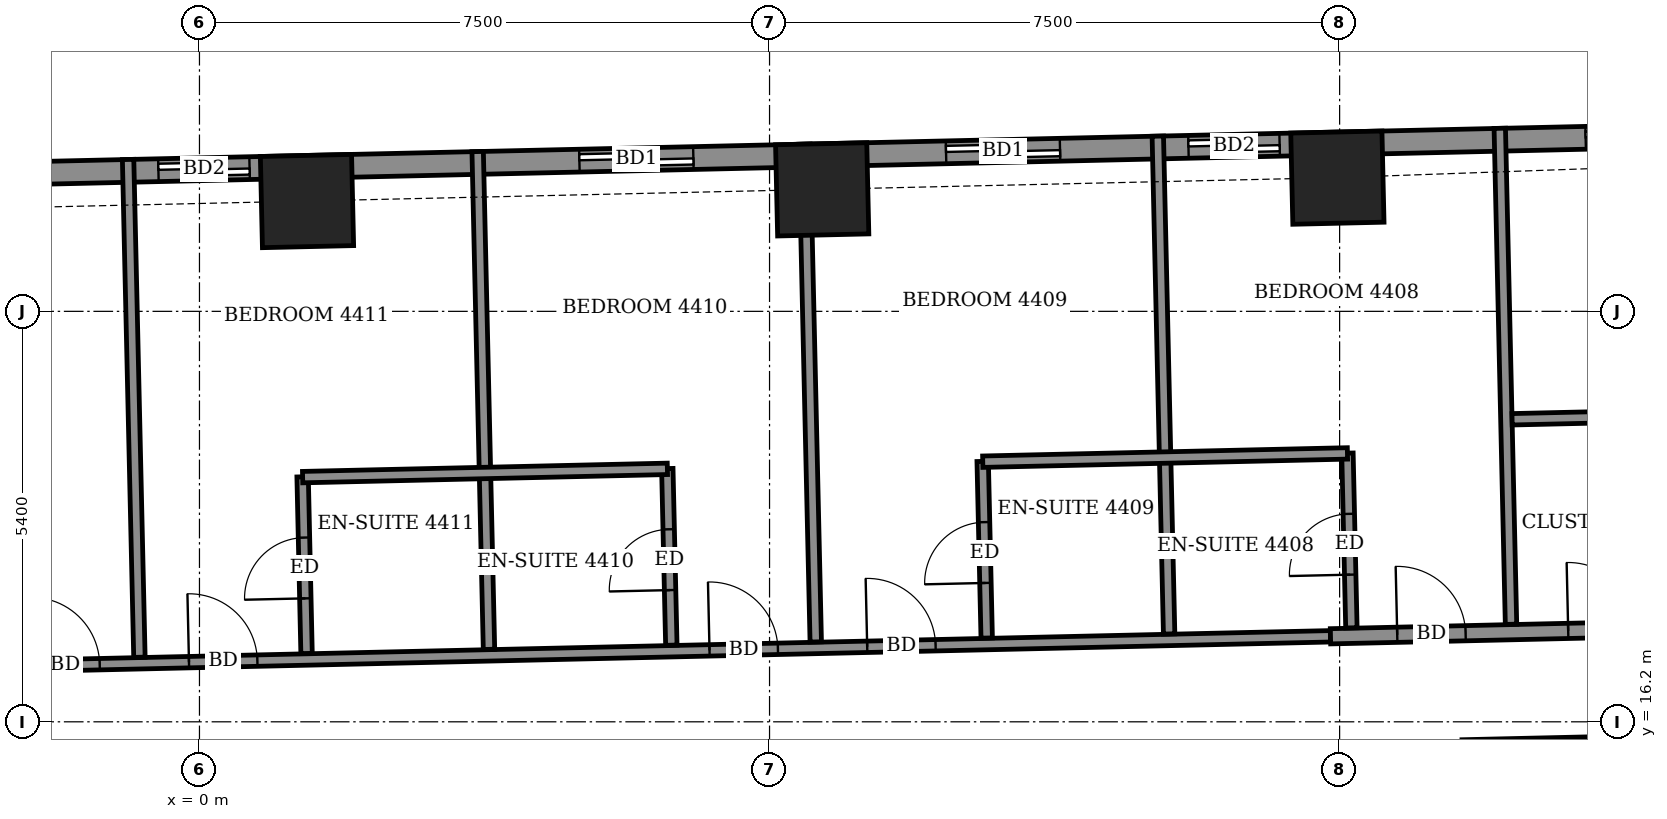
"""IFC4 building model, lengths in metres.
Left out: names, types, materials, properties, quantities, classifications, styles, units other than length and angle.
Written with IfcOpenShell. Run it as: python <this file> out.ifc"""

import sys

from ifc_helpers import new_model, si_unit, direction, frame, frame_2d, origin, origin_2d, place, context, subcontext, project, spatial, rectangle, extrude, element, fill, save


model = new_model("IFC4")
c1 = context("Model", 3, precision=1e-05, world=origin(), true_north=direction((0.0, 1.0)))
c2 = subcontext(c1, "Body", "Model", "MODEL_VIEW")
j1 = project(units=[si_unit("LENGTHUNIT", "METRE"), si_unit("PLANEANGLEUNIT", "RADIAN")], contexts=[c1])
p1 = place(None, origin())
s1 = spatial("IfcSite", under=j1, at=p1, CompositionType="ELEMENT")
p2 = place(p1, origin())
s2 = spatial("IfcBuilding", under=s1, at=p2, CompositionType="ELEMENT")
p3 = place(p2, frame((0.0, 0.0, 175.3)))
s3 = spatial("IfcBuildingStorey", under=s2, at=p3, CompositionType="ELEMENT", Elevation=175.3)
for number, where, z_axis, x_axis in (
    (1, (14.971, 23.359, -0.55), (0.0, 0.0, 1.0), (-1.0, -0.023, 0.0)),
    (2, (8.193, 23.205, -0.55), (0.0, 0.0, 1.0), (-1.0, -0.023, 0.0)),
    (3, (1.415, 23.051, -0.55), (0.0, 0.0, 1.0), (-1.0, -0.023, 0.0)),
):
    element("IfcColumn", number, at=place(p3, frame(where, z_axis=z_axis, x_axis=x_axis)), inside=s3, PredefinedType="COLUMN", context=c2, shape_type="SweptSolid", body=[
        extrude(rectangle(XDim=1.2, YDim=1.2, at=origin_2d()), origin(), (0.0, 0.0, 1.0), 3.6),
    ])
p4 = place(p3, frame((21.589, 23.959, 0.0), z_axis=(0.0, 0.0, 1.0), x_axis=(-0.999742671382, -0.022684598702, 0.0)))
e4 = element("IfcWall", 4, at=p4, inside=s3, PredefinedType="SOLIDWALL", context=c2, shape_type="SweptSolid", body=[
    extrude(rectangle(XDim=40.381, YDim=0.3, at=frame_2d((20.19, 0.0))), origin(), (0.0, 0.0, 1.0), 3.05),
])
p5 = place(p4, frame((1.853, 0.0, 0.0)))
e5 = element("IfcOpeningElement", 5, at=p5, cuts=e4, PredefinedType="OPENING", context=c2, shape_type="SweptSolid", body=[
    extrude(rectangle(XDim=1.5, YDim=2.4, at=frame_2d((0.75, 1.2))), frame((0.0, 0.16, 0.0), z_axis=(0.0, -1.0, 0.0), x_axis=(1.0, 0.0, 0.0)), (0.0, 0.0, 1.0), 0.32),
])
p6 = place(p4, frame((7.38, 0.0, 0.0)))
e6 = element("IfcOpeningElement", 6, at=p6, cuts=e4, PredefinedType="OPENING", context=c2, shape_type="SweptSolid", body=[
    extrude(rectangle(XDim=1.2, YDim=2.4, at=frame_2d((0.6, 1.2))), frame((0.0, 0.16, 0.0), z_axis=(0.0, -1.0, 0.0), x_axis=(1.0, 0.0, 0.0)), (0.0, 0.0, 1.0), 0.32),
])
p7 = place(p4, frame((10.27, 0.0, 0.0)))
e7 = element("IfcOpeningElement", 7, at=p7, cuts=e4, PredefinedType="OPENING", context=c2, shape_type="SweptSolid", body=[
    extrude(rectangle(XDim=1.5, YDim=2.4, at=frame_2d((0.75, 1.2))), frame((0.0, 0.16, 0.0), z_axis=(0.0, -1.0, 0.0), x_axis=(1.0, 0.0, 0.0)), (0.0, 0.0, 1.0), 0.32),
])
p8 = place(p4, frame((15.095, 0.0, 0.0)))
e8 = element("IfcOpeningElement", 8, at=p8, cuts=e4, PredefinedType="OPENING", context=c2, shape_type="SweptSolid", body=[
    extrude(rectangle(XDim=1.5, YDim=2.4, at=frame_2d((0.75, 1.2))), frame((0.0, 0.16, 0.0), z_axis=(0.0, -1.0, 0.0), x_axis=(1.0, 0.0, 0.0)), (0.0, 0.0, 1.0), 0.32),
])
p9 = place(p4, frame((20.935, 0.0, 0.0)))
e9 = element("IfcOpeningElement", 9, at=p9, cuts=e4, PredefinedType="OPENING", context=c2, shape_type="SweptSolid", body=[
    extrude(rectangle(XDim=1.2, YDim=2.4, at=frame_2d((0.6, 1.2))), frame((0.0, 0.16, 0.0), z_axis=(0.0, -1.0, 0.0), x_axis=(1.0, 0.0, 0.0)), (0.0, 0.0, 1.0), 0.32),
])
p10 = place(p4, frame((23.825, 0.0, 0.0)))
e10 = element("IfcOpeningElement", 10, at=p10, cuts=e4, PredefinedType="OPENING", context=c2, shape_type="SweptSolid", body=[
    extrude(rectangle(XDim=1.5, YDim=2.4, at=frame_2d((0.75, 1.2))), frame((0.0, 0.16, 0.0), z_axis=(0.0, -1.0, 0.0), x_axis=(1.0, 0.0, 0.0)), (0.0, 0.0, 1.0), 0.32),
])
p11 = place(p4, frame((28.65, 0.0, 0.0)))
e11 = element("IfcOpeningElement", 11, at=p11, cuts=e4, PredefinedType="OPENING", context=c2, shape_type="SweptSolid", body=[
    extrude(rectangle(XDim=1.5, YDim=2.4, at=frame_2d((0.75, 1.2))), frame((0.0, 0.16, 0.0), z_axis=(0.0, -1.0, 0.0), x_axis=(1.0, 0.0, 0.0)), (0.0, 0.0, 1.0), 0.32),
])
p12 = place(p4, frame((31.84, 0.0, 0.0)))
e12 = element("IfcOpeningElement", 12, at=p12, cuts=e4, PredefinedType="OPENING", context=c2, shape_type="SweptSolid", body=[
    extrude(rectangle(XDim=1.2, YDim=2.4, at=frame_2d((0.6, 1.2))), frame((0.0, 0.16, 0.0), z_axis=(0.0, -1.0, 0.0), x_axis=(1.0, 0.0, 0.0)), (0.0, 0.0, 1.0), 0.32),
])
p13 = place(p4, frame((36.57, 0.0, 0.9)))
e13 = element("IfcOpeningElement", 13, at=p13, cuts=e4, PredefinedType="OPENING", context=c2, shape_type="SweptSolid", body=[
    extrude(rectangle(XDim=2.4, YDim=1.5, at=frame_2d((1.2, 0.75))), frame((0.0, 0.16, 0.0), z_axis=(0.0, -1.0, 0.0), x_axis=(1.0, 0.0, 0.0)), (0.0, 0.0, 1.0), 0.32),
])
p14 = place(p3, frame((16.612, 15.864, 0.0), z_axis=(0.0, 0.0, 1.0), x_axis=(0.999741181744, 0.022750154412, 0.0)))
e14 = element("IfcWall", 14, at=p14, inside=s3, PredefinedType="PARTITIONING", context=c2, shape_type="SweptSolid", body=[
    extrude(rectangle(XDim=7.909, YDim=0.2, at=frame_2d((3.955, 0.0))), origin(), (0.0, 0.0, 1.0), 3.05),
])
p15 = place(p3, frame((-15.649, 16.633, 0.0), z_axis=(0.0, 0.0, 1.0), x_axis=(0.999743261737, 0.022658565952, 0.0)))
e15 = element("IfcWall", 15, at=p15, inside=s3, PredefinedType="PARTITIONING", context=c2, shape_type="SweptSolid", body=[
    extrude(rectangle(XDim=30.536, YDim=0.15, at=frame_2d((15.268, 0.0))), origin(), (0.0, 0.0, 1.0), 3.05),
])
p16 = place(p15, frame((24.44, 0.0, 0.0)))
e16 = element("IfcOpeningElement", 16, at=p16, cuts=e15, PredefinedType="OPENING", context=c2, shape_type="SweptSolid", body=[
    extrude(rectangle(XDim=0.9, YDim=2.1, at=frame_2d((0.45, 1.05))), frame((0.0, 0.085, 0.0), z_axis=(0.0, -1.0, 0.0), x_axis=(1.0, 0.0, 0.0)), (0.0, 0.0, 1.0), 0.17),
])
p17 = place(p15, frame((22.365, 0.0, 0.0)))
e17 = element("IfcOpeningElement", 17, at=p17, cuts=e15, PredefinedType="OPENING", context=c2, shape_type="SweptSolid", body=[
    extrude(rectangle(XDim=0.9, YDim=2.1, at=frame_2d((0.45, 1.05))), frame((0.0, 0.085, 0.0), z_axis=(0.0, -1.0, 0.0), x_axis=(1.0, 0.0, 0.0)), (0.0, 0.0, 1.0), 0.17),
])
p18 = place(p15, frame((15.515, 0.0, 0.0)))
e18 = element("IfcOpeningElement", 18, at=p18, cuts=e15, PredefinedType="OPENING", context=c2, shape_type="SweptSolid", body=[
    extrude(rectangle(XDim=0.9, YDim=2.1, at=frame_2d((0.45, 1.05))), frame((0.0, 0.085, 0.0), z_axis=(0.0, -1.0, 0.0), x_axis=(1.0, 0.0, 0.0)), (0.0, 0.0, 1.0), 0.17),
])
p19 = place(p15, frame((13.44, 0.0, 0.0)))
e19 = element("IfcOpeningElement", 19, at=p19, cuts=e15, PredefinedType="OPENING", context=c2, shape_type="SweptSolid", body=[
    extrude(rectangle(XDim=0.9, YDim=2.1, at=frame_2d((0.45, 1.05))), frame((0.0, 0.085, 0.0), z_axis=(0.0, -1.0, 0.0), x_axis=(1.0, 0.0, 0.0)), (0.0, 0.0, 1.0), 0.17),
])
p20 = place(p15, frame((6.565, 0.0, 0.0)))
e20 = element("IfcOpeningElement", 20, at=p20, cuts=e15, PredefinedType="OPENING", context=c2, shape_type="SweptSolid", body=[
    extrude(rectangle(XDim=0.9, YDim=2.1, at=frame_2d((0.45, 1.05))), frame((0.0, 0.085, 0.0), z_axis=(0.0, -1.0, 0.0), x_axis=(1.0, 0.0, 0.0)), (0.0, 0.0, 1.0), 0.17),
])
p21 = place(p15, frame((4.415, 0.0, 0.0)))
e21 = element("IfcOpeningElement", 21, at=p21, cuts=e15, PredefinedType="OPENING", context=c2, shape_type="SweptSolid", body=[
    extrude(rectangle(XDim=0.9, YDim=2.1, at=frame_2d((0.45, 1.05))), frame((0.0, 0.085, 0.0), z_axis=(0.0, -1.0, 0.0), x_axis=(1.0, 0.0, 0.0)), (0.0, 0.0, 1.0), 0.17),
])
p22 = place(p15, frame((0.2, 0.0, 0.0)))
e22 = element("IfcOpeningElement", 22, at=p22, cuts=e15, PredefinedType="OPENING", context=c2, shape_type="SweptSolid", body=[
    extrude(rectangle(XDim=0.9, YDim=2.1, at=frame_2d((0.45, 1.05))), frame((0.0, 0.085, 0.0), z_axis=(0.0, -1.0, 0.0), x_axis=(1.0, 0.0, 0.0)), (0.0, 0.0, 1.0), 0.17),
])
p23 = place(p3, frame((14.88, 17.325, 0.0), z_axis=(0.0, 0.0, 1.0), x_axis=(0.999742504166, 0.022691966963, 0.0)))
e23 = element("IfcWall", 23, at=p23, inside=s3, PredefinedType="PARTITIONING", context=c2, shape_type="SweptSolid", body=[
    extrude(rectangle(XDim=9.608, YDim=0.2, at=frame_2d((4.804, 0.0))), origin(), (0.0, 0.0, 1.0), 3.05),
])
p24 = place(p23, frame((7.393, 0.0, 0.0)))
e24 = element("IfcOpeningElement", 24, at=p24, cuts=e23, PredefinedType="OPENING", context=c2, shape_type="SweptSolid", body=[
    extrude(rectangle(XDim=1.0, YDim=2.1, at=frame_2d((0.5, 1.05))), frame((0.0, 0.11, 0.0), z_axis=(0.0, -1.0, 0.0), x_axis=(1.0, 0.0, 0.0)), (0.0, 0.0, 1.0), 0.22),
])
p25 = place(p23, frame((3.128, 0.0, 0.0)))
e25 = element("IfcOpeningElement", 25, at=p25, cuts=e23, PredefinedType="OPENING", context=c2, shape_type="SweptSolid", body=[
    extrude(rectangle(XDim=0.9, YDim=2.1, at=frame_2d((0.45, 1.05))), frame((0.0, 0.11, 0.0), z_axis=(0.0, -1.0, 0.0), x_axis=(1.0, 0.0, 0.0)), (0.0, 0.0, 1.0), 0.22),
])
p26 = place(p23, frame((0.878, 0.0, 0.0)))
e26 = element("IfcOpeningElement", 26, at=p26, cuts=e23, PredefinedType="OPENING", context=c2, shape_type="SweptSolid", body=[
    extrude(rectangle(XDim=0.9, YDim=2.1, at=frame_2d((0.45, 1.05))), frame((0.0, 0.11, 0.0), z_axis=(0.0, -1.0, 0.0), x_axis=(1.0, 0.0, 0.0)), (0.0, 0.0, 1.0), 0.22),
])
p27 = place(p3, frame((-0.79, 17.049, 0.0), z_axis=(0.0, 0.0, 1.0), x_axis=(-0.022734951231, 0.999741527592, 0.0)))
e27 = element("IfcWall", 27, at=p27, inside=s3, PredefinedType="PARTITIONING", context=c2, shape_type="SweptSolid", body=[
    extrude(rectangle(XDim=6.551, YDim=0.15, at=frame_2d((3.275, 0.0))), origin(), (0.0, 0.0, 1.0), 2.55),
])
p28 = place(p3, frame((1.409, 17.099, 0.0), z_axis=(0.0, 0.0, 1.0), x_axis=(-0.022370700241, 0.999749744571, 0.0)))
e28 = element("IfcWall", 28, at=p28, inside=s3, PredefinedType="PARTITIONING", context=c2, shape_type="SweptSolid", body=[
    extrude(rectangle(XDim=2.324, YDim=0.15, at=frame_2d((1.162, 0.0))), origin(), (0.0, 0.0, 1.0), 3.05),
])
p29 = place(p28, frame((0.725, 0.0, 0.0)))
e29 = element("IfcOpeningElement", 29, at=p29, cuts=e28, PredefinedType="OPENING", context=c2, shape_type="SweptSolid", body=[
    extrude(rectangle(XDim=0.8, YDim=2.1, at=frame_2d((0.4, 1.05))), frame((0.0, 0.085, 0.0), z_axis=(0.0, -1.0, 0.0), x_axis=(1.0, 0.0, 0.0)), (0.0, 0.0, 1.0), 0.17),
])
p30 = place(p3, frame((3.809, 17.153, 0.0), z_axis=(0.0, 0.0, 1.0), x_axis=(-0.022772202332, 0.999740679777, 0.0)))
e30 = element("IfcWall", 30, at=p30, inside=s3, PredefinedType="PARTITIONING", context=c2, shape_type="SweptSolid", body=[
    extrude(rectangle(XDim=6.551, YDim=0.15, at=frame_2d((3.275, 0.0))), origin(), (0.0, 0.0, 1.0), 2.55),
])
p31 = place(p3, frame((6.208, 17.208, 0.0), z_axis=(0.0, 0.0, 1.0), x_axis=(-0.02279059109, 0.999740260747, 0.0)))
e31 = element("IfcWall", 31, at=p31, inside=s3, PredefinedType="PARTITIONING", context=c2, shape_type="SweptSolid", body=[
    extrude(rectangle(XDim=2.324, YDim=0.15, at=frame_2d((1.162, 0.0))), origin(), (0.0, 0.0, 1.0), 3.05),
])
p32 = place(p31, frame((0.725, 0.0, 0.0)))
e32 = element("IfcOpeningElement", 32, at=p32, cuts=e31, PredefinedType="OPENING", context=c2, shape_type="SweptSolid", body=[
    extrude(rectangle(XDim=0.8, YDim=2.1, at=frame_2d((0.4, 1.05))), frame((0.0, 0.085, 0.0), z_axis=(0.0, -1.0, 0.0), x_axis=(1.0, 0.0, 0.0)), (0.0, 0.0, 1.0), 0.17),
])
p33 = place(p3, frame((8.108, 17.251, 0.0), z_axis=(0.0, 0.0, 1.0), x_axis=(-0.022734104141, 0.999741546855, 0.0)))
e33 = element("IfcWall", 33, at=p33, inside=s3, PredefinedType="PARTITIONING", context=c2, shape_type="SweptSolid", body=[
    extrude(rectangle(XDim=6.551, YDim=0.15, at=frame_2d((3.275, 0.0))), origin(), (0.0, 0.0, 1.0), 3.05),
])
p34 = place(p3, frame((10.357, 17.302, 0.0), z_axis=(0.0, 0.0, 1.0), x_axis=(-0.02279059109, 0.999740260747, 0.0)))
e34 = element("IfcWall", 34, at=p34, inside=s3, PredefinedType="PARTITIONING", context=c2, shape_type="SweptSolid", body=[
    extrude(rectangle(XDim=2.324, YDim=0.15, at=frame_2d((1.162, 0.0))), origin(), (0.0, 0.0, 1.0), 3.05),
])
p35 = place(p34, frame((0.725, 0.0, 0.0)))
e35 = element("IfcOpeningElement", 35, at=p35, cuts=e34, PredefinedType="OPENING", context=c2, shape_type="SweptSolid", body=[
    extrude(rectangle(XDim=0.8, YDim=2.1, at=frame_2d((0.4, 1.05))), frame((0.0, 0.085, 0.0), z_axis=(0.0, -1.0, 0.0), x_axis=(1.0, 0.0, 0.0)), (0.0, 0.0, 1.0), 0.17),
])
p36 = place(p3, frame((12.757, 17.356, 0.0), z_axis=(0.0, 0.0, 1.0), x_axis=(-0.022771353855, 0.999740699103, 0.0)))
e36 = element("IfcWall", 36, at=p36, inside=s3, PredefinedType="PARTITIONING", context=c2, shape_type="SweptSolid", body=[
    extrude(rectangle(XDim=6.551, YDim=0.15, at=frame_2d((3.275, 0.0))), origin(), (0.0, 0.0, 1.0), 2.55),
])
p37 = place(p3, frame((15.155, 17.436, 0.0), z_axis=(0.0, 0.0, 1.0), x_axis=(-0.022612884682, 0.999744296031, 0.0)))
e37 = element("IfcWall", 37, at=p37, inside=s3, PredefinedType="PARTITIONING", context=c2, shape_type="SweptSolid", body=[
    extrude(rectangle(XDim=2.3, YDim=0.15, at=frame_2d((1.15, 0.0))), origin(), (0.0, 0.0, 1.0), 3.05),
])
p38 = place(p37, frame((0.7, 0.0, 0.0)))
e38 = element("IfcOpeningElement", 38, at=p38, cuts=e37, PredefinedType="OPENING", context=c2, shape_type="SweptSolid", body=[
    extrude(rectangle(XDim=0.8, YDim=2.1, at=frame_2d((0.4, 1.05))), frame((0.0, 0.085, 0.0), z_axis=(0.0, -1.0, 0.0), x_axis=(1.0, 0.0, 0.0)), (0.0, 0.0, 1.0), 0.17),
])
p39 = place(p3, frame((17.255, 17.483, 0.0), z_axis=(0.0, 0.0, 1.0), x_axis=(-0.022667874761, 0.999743050715, 0.0)))
e39 = element("IfcWall", 39, at=p39, inside=s3, PredefinedType="PARTITIONING", context=c2, shape_type="SweptSolid", body=[
    extrude(rectangle(XDim=6.527, YDim=0.15, at=frame_2d((3.263, 0.0))), origin(), (0.0, 0.0, 1.0), 2.55),
])
p40 = place(p3, frame((1.357, 19.419, 0.0), z_axis=(0.0, 0.0, 1.0), x_axis=(0.99974154664, 0.022734113616, 0.0)))
e40 = element("IfcWall", 40, at=p40, inside=s3, PredefinedType="PARTITIONING", context=c2, shape_type="SweptSolid", body=[
    extrude(rectangle(XDim=4.8, YDim=0.15, at=frame_2d((2.4, 0.0))), origin(), (0.0, 0.0, 1.0), 3.05),
])
p41 = place(p3, frame((10.305, 19.622, 0.0), z_axis=(0.0, 0.0, 1.0), x_axis=(0.999742596585, 0.02268789488, 0.0)))
e41 = element("IfcWall", 41, at=p41, inside=s3, PredefinedType="PARTITIONING", context=c2, shape_type="SweptSolid", body=[
    extrude(rectangle(XDim=4.799, YDim=0.15, at=frame_2d((2.4, 0.0))), origin(), (0.0, 0.0, 1.0), 3.05),
])
p42 = place(p3, frame((17.269, 20.18, 0.0), z_axis=(0.0, 0.0, 1.0), x_axis=(0.999740260747, 0.02279059109, 0.0)))
e42 = element("IfcWall", 42, at=p42, inside=s3, PredefinedType="PARTITIONING", context=c2, shape_type="SweptSolid", body=[
    extrude(rectangle(XDim=2.324, YDim=0.15, at=frame_2d((1.162, 0.0))), origin(), (0.0, 0.0, 1.0), 3.05),
])
p43 = place(p5, origin())
e43 = element("IfcDoor", 43, at=p43, inside=s3, OperationType="SLIDING_TO_LEFT", PredefinedType="DOOR", context=c2, shape_type="SweptSolid", body=[
    extrude(rectangle(XDim=1.5, YDim=2.4, at=frame_2d((0.75, 1.2))), frame((0.0, 0.025, 0.0), z_axis=(0.0, -1.0, 0.0), x_axis=(1.0, 0.0, 0.0)), (0.0, 0.0, 1.0), 0.05),
])
fill(e5, e43)
p44 = place(p6, origin())
e44 = element("IfcDoor", 44, at=p44, inside=s3, OperationType="SLIDING_TO_LEFT", PredefinedType="DOOR", context=c2, shape_type="SweptSolid", body=[
    extrude(rectangle(XDim=1.2, YDim=2.4, at=frame_2d((0.6, 1.2))), frame((0.0, 0.025, 0.0), z_axis=(0.0, -1.0, 0.0), x_axis=(1.0, 0.0, 0.0)), (0.0, 0.0, 1.0), 0.05),
])
fill(e6, e44)
p45 = place(p7, origin())
e45 = element("IfcDoor", 45, at=p45, inside=s3, OperationType="SLIDING_TO_LEFT", PredefinedType="DOOR", context=c2, shape_type="SweptSolid", body=[
    extrude(rectangle(XDim=1.5, YDim=2.4, at=frame_2d((0.75, 1.2))), frame((0.0, 0.025, 0.0), z_axis=(0.0, -1.0, 0.0), x_axis=(1.0, 0.0, 0.0)), (0.0, 0.0, 1.0), 0.05),
])
fill(e7, e45)
p46 = place(p8, origin())
e46 = element("IfcDoor", 46, at=p46, inside=s3, OperationType="SLIDING_TO_LEFT", PredefinedType="DOOR", context=c2, shape_type="SweptSolid", body=[
    extrude(rectangle(XDim=1.5, YDim=2.4, at=frame_2d((0.75, 1.2))), frame((0.0, 0.025, 0.0), z_axis=(0.0, -1.0, 0.0), x_axis=(1.0, 0.0, 0.0)), (0.0, 0.0, 1.0), 0.05),
])
fill(e8, e46)
p47 = place(p9, origin())
e47 = element("IfcDoor", 47, at=p47, inside=s3, OperationType="SLIDING_TO_LEFT", PredefinedType="DOOR", context=c2, shape_type="SweptSolid", body=[
    extrude(rectangle(XDim=1.2, YDim=2.4, at=frame_2d((0.6, 1.2))), frame((0.0, 0.025, 0.0), z_axis=(0.0, -1.0, 0.0), x_axis=(1.0, 0.0, 0.0)), (0.0, 0.0, 1.0), 0.05),
])
fill(e9, e47)
p48 = place(p25, origin())
e48 = element("IfcDoor", 48, at=p48, inside=s3, OperationType="SINGLE_SWING_LEFT", PredefinedType="DOOR", context=c2, shape_type="SweptSolid", body=[
    extrude(rectangle(XDim=0.9, YDim=2.1, at=frame_2d((0.45, 1.05))), frame((0.0, 0.025, 0.0), z_axis=(0.0, -1.0, 0.0), x_axis=(1.0, 0.0, 0.0)), (0.0, 0.0, 1.0), 0.05),
])
fill(e25, e48)
p49 = place(p26, origin())
e49 = element("IfcDoor", 49, at=p49, inside=s3, OperationType="SINGLE_SWING_RIGHT", PredefinedType="DOOR", context=c2, shape_type="SweptSolid", body=[
    extrude(rectangle(XDim=0.9, YDim=2.1, at=frame_2d((0.45, 1.05))), frame((0.0, 0.025, 0.0), z_axis=(0.0, -1.0, 0.0), x_axis=(1.0, 0.0, 0.0)), (0.0, 0.0, 1.0), 0.05),
])
fill(e26, e49)
p50 = place(p38, origin())
e50 = element("IfcDoor", 50, at=p50, inside=s3, OperationType="SINGLE_SWING_RIGHT", PredefinedType="DOOR", context=c2, shape_type="SweptSolid", body=[
    extrude(rectangle(XDim=0.8, YDim=2.1, at=frame_2d((0.4, 1.05))), frame((0.0, 0.025, 0.0), z_axis=(0.0, -1.0, 0.0), x_axis=(1.0, 0.0, 0.0)), (0.0, 0.0, 1.0), 0.05),
])
fill(e38, e50)
p51 = place(p16, origin())
e51 = element("IfcDoor", 51, at=p51, inside=s3, OperationType="SINGLE_SWING_LEFT", PredefinedType="DOOR", context=c2, shape_type="SweptSolid", body=[
    extrude(rectangle(XDim=0.9, YDim=2.1, at=frame_2d((0.45, 1.05))), frame((0.0, 0.025, 0.0), z_axis=(0.0, -1.0, 0.0), x_axis=(1.0, 0.0, 0.0)), (0.0, 0.0, 1.0), 0.05),
])
fill(e16, e51)
p52 = place(p35, origin())
e52 = element("IfcDoor", 52, at=p52, inside=s3, OperationType="SINGLE_SWING_LEFT", PredefinedType="DOOR", context=c2, shape_type="SweptSolid", body=[
    extrude(rectangle(XDim=0.8, YDim=2.1, at=frame_2d((0.4, 1.05))), frame((0.0, 0.025, 0.0), z_axis=(0.0, -1.0, 0.0), x_axis=(1.0, 0.0, 0.0)), (0.0, 0.0, 1.0), 0.05),
])
fill(e35, e52)
p53 = place(p17, origin())
e53 = element("IfcDoor", 53, at=p53, inside=s3, OperationType="SINGLE_SWING_RIGHT", PredefinedType="DOOR", context=c2, shape_type="SweptSolid", body=[
    extrude(rectangle(XDim=0.9, YDim=2.1, at=frame_2d((0.45, 1.05))), frame((0.0, 0.025, 0.0), z_axis=(0.0, -1.0, 0.0), x_axis=(1.0, 0.0, 0.0)), (0.0, 0.0, 1.0), 0.05),
])
fill(e17, e53)
p54 = place(p32, origin())
e54 = element("IfcDoor", 54, at=p54, inside=s3, OperationType="SINGLE_SWING_RIGHT", PredefinedType="DOOR", context=c2, shape_type="SweptSolid", body=[
    extrude(rectangle(XDim=0.8, YDim=2.1, at=frame_2d((0.4, 1.05))), frame((0.0, 0.025, 0.0), z_axis=(0.0, -1.0, 0.0), x_axis=(1.0, 0.0, 0.0)), (0.0, 0.0, 1.0), 0.05),
])
fill(e32, e54)
p55 = place(p18, origin())
e55 = element("IfcDoor", 55, at=p55, inside=s3, OperationType="SINGLE_SWING_LEFT", PredefinedType="DOOR", context=c2, shape_type="SweptSolid", body=[
    extrude(rectangle(XDim=0.9, YDim=2.1, at=frame_2d((0.45, 1.05))), frame((0.0, 0.025, 0.0), z_axis=(0.0, -1.0, 0.0), x_axis=(1.0, 0.0, 0.0)), (0.0, 0.0, 1.0), 0.05),
])
fill(e18, e55)
p56 = place(p29, origin())
e56 = element("IfcDoor", 56, at=p56, inside=s3, OperationType="SINGLE_SWING_LEFT", PredefinedType="DOOR", context=c2, shape_type="SweptSolid", body=[
    extrude(rectangle(XDim=0.8, YDim=2.1, at=frame_2d((0.4, 1.05))), frame((0.0, 0.025, 0.0), z_axis=(0.0, -1.0, 0.0), x_axis=(1.0, 0.0, 0.0)), (0.0, 0.0, 1.0), 0.05),
])
fill(e29, e56)
p57 = place(p19, origin())
e57 = element("IfcDoor", 57, at=p57, inside=s3, OperationType="SINGLE_SWING_RIGHT", PredefinedType="DOOR", context=c2, shape_type="SweptSolid", body=[
    extrude(rectangle(XDim=0.9, YDim=2.1, at=frame_2d((0.45, 1.05))), frame((0.0, 0.025, 0.0), z_axis=(0.0, -1.0, 0.0), x_axis=(1.0, 0.0, 0.0)), (0.0, 0.0, 1.0), 0.05),
])
fill(e19, e57)
save(model, sys.argv[1])
